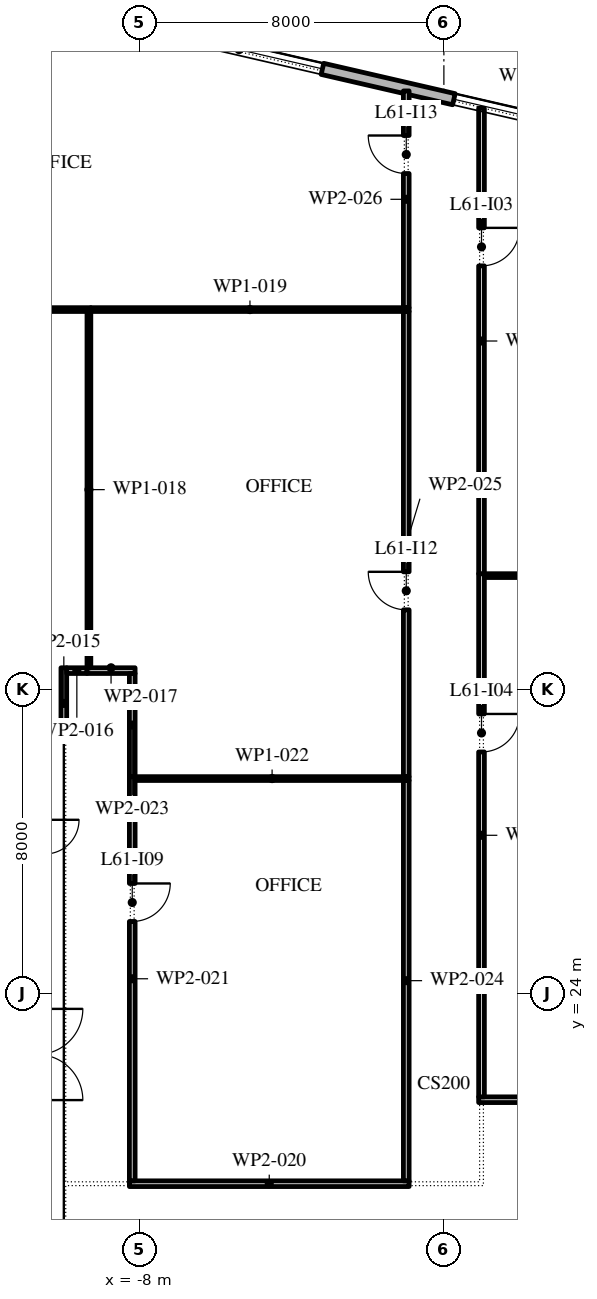
"""IFC4 building model, lengths in metres.
Left out: names, types, materials, properties, quantities, classifications, styles, units other than length and angle.
Written with IfcOpenShell. Run it as: python <this file> out.ifc"""

import sys

from ifc_helpers import new_model, si_unit, direction, frame, frame_2d, origin, place, context, subcontext, project, spatial, rectangle, extrude, element, fill, save


model = new_model("IFC4")
c1 = context("Model", 3, precision=1e-05, world=origin(), true_north=direction((0.0, 1.0)))
c2 = subcontext(c1, "Body", "Model", "MODEL_VIEW")
j1 = project(units=[si_unit("LENGTHUNIT", "METRE"), si_unit("PLANEANGLEUNIT", "RADIAN")], contexts=[c1])
p1 = place(None, origin())
s1 = spatial("IfcSite", under=j1, at=p1, CompositionType="ELEMENT")
p2 = place(p1, origin())
s2 = spatial("IfcBuilding", under=s1, at=p2, CompositionType="ELEMENT")
p3 = place(p2, frame((0.0, 0.0, 280.8)))
s3 = spatial("IfcBuildingStorey", under=s2, at=p3, CompositionType="ELEMENT", Elevation=280.8)
p4 = place(p3, frame((29.616, 40.758, 0.0), z_axis=(0.0, 0.0, 1.0), x_axis=(-0.974370532314, 0.224949029246, 0.0)))
e1 = element("IfcWall", 1, at=p4, inside=s3, PredefinedType="STANDARD", context=c2, shape_type="SweptSolid", body=[
    extrude(rectangle(XDim=48.0, YDim=0.3, at=frame_2d((24.0, 0.0))), origin(), (0.0, 0.0, 1.0), 4.0),
])
p5 = place(p4, frame((1.625, 0.0, 0.45)))
e2 = element("IfcOpeningElement", 2, at=p5, cuts=e1, PredefinedType="OPENING", context=c2, shape_type="SweptSolid", body=[
    extrude(rectangle(XDim=4.5, YDim=2.575, at=frame_2d((2.25, 1.288))), frame((0.0, 0.16, 0.0), z_axis=(0.0, -1.0, 0.0), x_axis=(1.0, 0.0, 0.0)), (0.0, 0.0, 1.0), 0.32),
])
p6 = place(p4, frame((10.575, 0.0, 0.0)))
e3 = element("IfcOpeningElement", 3, at=p6, cuts=e1, PredefinedType="OPENING", context=c2, shape_type="SweptSolid", body=[
    extrude(rectangle(XDim=2.4, YDim=3.5, at=frame_2d((1.2, 1.75))), frame((0.0, 0.16, 0.0), z_axis=(0.0, -1.0, 0.0), x_axis=(1.0, 0.0, 0.0)), (0.0, 0.0, 1.0), 0.32),
])
p7 = place(p4, frame((17.575, 0.0, 0.45)))
e4 = element("IfcOpeningElement", 4, at=p7, cuts=e1, PredefinedType="OPENING", context=c2, shape_type="SweptSolid", body=[
    extrude(rectangle(XDim=4.5, YDim=2.45, at=frame_2d((2.25, 1.225))), frame((0.0, 0.16, 0.0), z_axis=(0.0, -1.0, 0.0), x_axis=(1.0, 0.0, 0.0)), (0.0, 0.0, 1.0), 0.32),
])
p8 = place(p4, frame((25.625, 0.0, 0.45)))
e5 = element("IfcOpeningElement", 5, at=p8, cuts=e1, PredefinedType="OPENING", context=c2, shape_type="SweptSolid", body=[
    extrude(rectangle(XDim=4.5, YDim=2.45, at=frame_2d((2.25, 1.225))), frame((0.0, 0.16, 0.0), z_axis=(0.0, -1.0, 0.0), x_axis=(1.0, 0.0, 0.0)), (0.0, 0.0, 1.0), 0.32),
])
p9 = place(p4, frame((33.675, 0.0, 0.45)))
e6 = element("IfcOpeningElement", 6, at=p9, cuts=e1, PredefinedType="OPENING", context=c2, shape_type="SweptSolid", body=[
    extrude(rectangle(XDim=4.5, YDim=2.45, at=frame_2d((2.25, 1.225))), frame((0.0, 0.16, 0.0), z_axis=(0.0, -1.0, 0.0), x_axis=(1.0, 0.0, 0.0)), (0.0, 0.0, 1.0), 0.32),
])
p10 = place(p4, frame((42.775, 0.0, 0.0)))
e7 = element("IfcOpeningElement", 7, at=p10, cuts=e1, PredefinedType="OPENING", context=c2, shape_type="SweptSolid", body=[
    extrude(rectangle(XDim=2.4, YDim=3.5, at=frame_2d((1.2, 1.75))), frame((0.0, 0.16, 0.0), z_axis=(0.0, -1.0, 0.0), x_axis=(1.0, 0.0, 0.0)), (0.0, 0.0, 1.0), 0.32),
])
p11 = place(p3, frame((-19.5, 42.0, 0.0), z_axis=(0.0, 0.0, 1.0), x_axis=(1.0, 0.0, 0.0)))
e8 = element("IfcWall", 8, at=p11, inside=s3, PredefinedType="PARTITIONING", context=c2, shape_type="SweptSolid", body=[
    extrude(rectangle(XDim=10.21, YDim=0.1, at=frame_2d((5.105, 0.0))), origin(), (0.0, 0.0, 1.0), 4.0),
])
p12 = place(p11, frame((2.7, 0.0, 0.0)))
e9 = element("IfcOpeningElement", 9, at=p12, cuts=e8, PredefinedType="OPENING", context=c2, shape_type="SweptSolid", body=[
    extrude(rectangle(XDim=0.9, YDim=2.1, at=frame_2d((0.45, 1.05))), frame((0.0, 0.06, 0.0), z_axis=(0.0, -1.0, 0.0), x_axis=(1.0, 0.0, 0.0)), (0.0, 0.0, 1.0), 0.12),
])
p13 = place(p3, frame((-10.0, 30.7, 0.0), z_axis=(0.0, 0.0, 1.0), x_axis=(0.0, 1.0, 0.0)))
e10 = element("IfcWall", 10, at=p13, inside=s3, PredefinedType="PARTITIONING", context=c2, shape_type="SweptSolid", body=[
    extrude(rectangle(XDim=1.875, YDim=0.15, at=frame_2d((0.938, 0.0))), origin(), (0.0, 0.0, 1.0), 4.0),
])
p14 = place(p3, frame((-9.925, 32.5, 0.0), z_axis=(0.0, 0.0, 1.0), x_axis=(1.0, 0.0, 0.0)))
e11 = element("IfcWall", 11, at=p14, inside=s3, PredefinedType="PARTITIONING", context=c2, shape_type="SweptSolid", body=[
    extrude(rectangle(XDim=0.535, YDim=0.15, at=frame_2d((0.268, 0.0))), origin(), (0.0, 0.0, 1.0), 4.0),
])
p15 = place(p3, frame((-9.39, 32.5, 0.0), z_axis=(0.0, 0.0, 1.0), x_axis=(1.0, 0.0, 0.0)))
e12 = element("IfcWall", 12, at=p15, inside=s3, PredefinedType="PARTITIONING", context=c2, shape_type="SweptSolid", body=[
    extrude(rectangle(XDim=1.265, YDim=0.15, at=frame_2d((0.632, 0.0))), origin(), (0.0, 0.0, 1.0), 4.0),
])
p16 = place(p3, frame((-9.34, 41.95, 0.0), z_axis=(0.0, 0.0, 1.0), x_axis=(0.0, -1.0, 0.0)))
e13 = element("IfcWall", 13, at=p16, inside=s3, PredefinedType="PARTITIONING", context=c2, shape_type="SweptSolid", body=[
    extrude(rectangle(XDim=9.375, YDim=0.1, at=frame_2d((4.688, 0.0))), origin(), (0.0, 0.0, 1.0), 4.0),
])
p17 = place(p3, frame((-9.29, 42.0, 0.0), z_axis=(0.0, 0.0, 1.0), x_axis=(1.0, 0.0, 0.0)))
e14 = element("IfcWall", 14, at=p17, inside=s3, PredefinedType="PARTITIONING", context=c2, shape_type="SweptSolid", body=[
    extrude(rectangle(XDim=8.375, YDim=0.1, at=frame_2d((4.188, 0.0))), origin(), (0.0, 0.0, 1.0), 4.0),
])
p18 = place(p3, frame((-8.275, 19.0, 0.0), z_axis=(0.0, 0.0, 1.0), x_axis=(1.0, 0.0, 0.0)))
e15 = element("IfcWall", 15, at=p18, inside=s3, PredefinedType="PARTITIONING", context=c2, shape_type="SweptSolid", body=[
    extrude(rectangle(XDim=7.36, YDim=0.15, at=frame_2d((3.68, 0.0))), origin(), (0.0, 0.0, 1.0), 4.0),
])
p19 = place(p3, frame((-8.2, 29.71, 0.0), z_axis=(0.0, 0.0, 1.0), x_axis=(0.0, -1.0, 0.0)))
e16 = element("IfcWall", 16, at=p19, inside=s3, PredefinedType="PARTITIONING", context=c2, shape_type="SweptSolid", body=[
    extrude(rectangle(XDim=10.635, YDim=0.15, at=frame_2d((5.317, 0.0))), origin(), (0.0, 0.0, 1.0), 4.0),
])
p20 = place(p19, frame((2.81, 0.0, 0.0)))
e17 = element("IfcOpeningElement", 17, at=p20, cuts=e16, PredefinedType="OPENING", context=c2, shape_type="SweptSolid", body=[
    extrude(rectangle(XDim=1.0, YDim=2.1, at=frame_2d((0.5, 1.05))), frame((0.0, 0.085, 0.0), z_axis=(0.0, -1.0, 0.0), x_axis=(1.0, 0.0, 0.0)), (0.0, 0.0, 1.0), 0.17),
])
p21 = place(p3, frame((-8.125, 29.66, 0.0), z_axis=(0.0, 0.0, 1.0), x_axis=(1.0, 0.0, 0.0)))
e18 = element("IfcWall", 18, at=p21, inside=s3, PredefinedType="PARTITIONING", context=c2, shape_type="SweptSolid", body=[
    extrude(rectangle(XDim=7.21, YDim=0.1, at=frame_2d((3.605, 0.0))), origin(), (0.0, 0.0, 1.0), 4.0),
])
p22 = place(p3, frame((-8.2, 32.425, 0.0), z_axis=(0.0, 0.0, 1.0), x_axis=(0.0, -1.0, 0.0)))
e19 = element("IfcWall", 19, at=p22, inside=s3, PredefinedType="PARTITIONING", context=c2, shape_type="SweptSolid", body=[
    extrude(rectangle(XDim=2.715, YDim=0.15, at=frame_2d((1.357, 0.0))), origin(), (0.0, 0.0, 1.0), 4.0),
])
p23 = place(p3, frame((-0.99, 19.075, 0.0), z_axis=(0.0, 0.0, 1.0), x_axis=(0.0, 1.0, 0.0)))
e20 = element("IfcWall", 20, at=p23, inside=s3, PredefinedType="PARTITIONING", context=c2, shape_type="SweptSolid", body=[
    extrude(rectangle(XDim=10.535, YDim=0.15, at=frame_2d((5.268, 0.0))), origin(), (0.0, 0.0, 1.0), 4.0),
])
p24 = place(p3, frame((-0.99, 29.71, 0.0), z_axis=(0.0, 0.0, 1.0), x_axis=(0.0, 1.0, 0.0)))
e21 = element("IfcWall", 21, at=p24, inside=s3, PredefinedType="PARTITIONING", context=c2, shape_type="SweptSolid", body=[
    extrude(rectangle(XDim=12.24, YDim=0.15, at=frame_2d((6.12, 0.0))), origin(), (0.0, 0.0, 1.0), 4.0),
])
p25 = place(p24, frame((4.39, 0.0, 0.0)))
e22 = element("IfcOpeningElement", 22, at=p25, cuts=e21, PredefinedType="OPENING", context=c2, shape_type="SweptSolid", body=[
    extrude(rectangle(XDim=1.0, YDim=2.1, at=frame_2d((0.5, 1.05))), frame((0.0, 0.085, 0.0), z_axis=(0.0, -1.0, 0.0), x_axis=(1.0, 0.0, 0.0)), (0.0, 0.0, 1.0), 0.17),
])
p26 = place(p3, frame((-0.99, 42.05, 0.0), z_axis=(0.0, 0.0, 1.0), x_axis=(0.0, 1.0, 0.0)))
e23 = element("IfcWall", 23, at=p26, inside=s3, PredefinedType="PARTITIONING", context=c2, shape_type="SweptSolid", body=[
    extrude(rectangle(XDim=5.703, YDim=0.15, at=frame_2d((2.852, 0.0))), origin(), (0.0, 0.0, 1.0), 4.0),
])
p27 = place(p26, frame((3.53, 0.0, 0.0)))
e24 = element("IfcOpeningElement", 24, at=p27, cuts=e23, PredefinedType="OPENING", context=c2, shape_type="SweptSolid", body=[
    extrude(rectangle(XDim=1.0, YDim=2.1, at=frame_2d((0.5, 1.05))), frame((0.0, 0.085, 0.0), z_axis=(0.0, -1.0, 0.0), x_axis=(1.0, 0.0, 0.0)), (0.0, 0.0, 1.0), 0.17),
])
p28 = place(p3, frame((0.915, 21.21, 0.0), z_axis=(0.0, 0.0, 1.0), x_axis=(1.0, 0.0, 0.0)))
e25 = element("IfcWall", 25, at=p28, inside=s3, PredefinedType="PARTITIONING", context=c2, shape_type="SweptSolid", body=[
    extrude(rectangle(XDim=7.36, YDim=0.15, at=frame_2d((3.68, 0.0))), origin(), (0.0, 0.0, 1.0), 4.0),
])
p29 = place(p3, frame((0.99, 35.05, 0.0), z_axis=(0.0, 0.0, 1.0), x_axis=(0.0, -1.0, 0.0)))
e26 = element("IfcWall", 26, at=p29, inside=s3, PredefinedType="PARTITIONING", context=c2, shape_type="SweptSolid", body=[
    extrude(rectangle(XDim=13.765, YDim=0.15, at=frame_2d((6.883, 0.0))), origin(), (0.0, 0.0, 1.0), 4.0),
])
p30 = place(p29, frame((3.69, 0.0, 0.0)))
e27 = element("IfcOpeningElement", 27, at=p30, cuts=e26, PredefinedType="OPENING", context=c2, shape_type="SweptSolid", body=[
    extrude(rectangle(XDim=1.0, YDim=2.1, at=frame_2d((0.5, 1.05))), frame((0.0, 0.085, 0.0), z_axis=(0.0, -1.0, 0.0), x_axis=(1.0, 0.0, 0.0)), (0.0, 0.0, 1.0), 0.17),
])
p31 = place(p3, frame((0.99, 47.296, 0.0), z_axis=(0.0, 0.0, 1.0), x_axis=(0.0, -1.0, 0.0)))
e28 = element("IfcWall", 28, at=p31, inside=s3, PredefinedType="PARTITIONING", context=c2, shape_type="SweptSolid", body=[
    extrude(rectangle(XDim=12.246, YDim=0.15, at=frame_2d((6.123, 0.0))), origin(), (0.0, 0.0, 1.0), 4.0),
])
p32 = place(p31, frame((3.146, 0.0, 0.0)))
e29 = element("IfcOpeningElement", 29, at=p32, cuts=e28, PredefinedType="OPENING", context=c2, shape_type="SweptSolid", body=[
    extrude(rectangle(XDim=1.0, YDim=2.1, at=frame_2d((0.5, 1.05))), frame((0.0, 0.085, 0.0), z_axis=(0.0, -1.0, 0.0), x_axis=(1.0, 0.0, 0.0)), (0.0, 0.0, 1.0), 0.17),
])
p33 = place(p3, frame((14.24, 35.0, 0.0), z_axis=(0.0, 0.0, 1.0), x_axis=(-1.0, 0.0, 0.0)))
e30 = element("IfcWall", 30, at=p33, inside=s3, PredefinedType="PARTITIONING", context=c2, shape_type="SweptSolid", body=[
    extrude(rectangle(XDim=13.175, YDim=0.1, at=frame_2d((6.587, 0.0))), origin(), (0.0, 0.0, 1.0), 4.0),
])
p34 = place(p8, origin())
e31 = element("IfcWindow", 31, at=p34, inside=s3, PartitioningType="DOUBLE_PANEL_VERTICAL", PredefinedType="WINDOW", context=c2, shape_type="SweptSolid", body=[
    extrude(rectangle(XDim=4.5, YDim=2.45, at=frame_2d((2.25, 1.225))), frame((0.0, 0.03, 0.0), z_axis=(0.0, -1.0, 0.0), x_axis=(1.0, 0.0, 0.0)), (0.0, 0.0, 1.0), 0.06),
])
fill(e5, e31)
p35 = place(p9, origin())
e32 = element("IfcWindow", 32, at=p35, inside=s3, PartitioningType="DOUBLE_PANEL_VERTICAL", PredefinedType="WINDOW", context=c2, shape_type="SweptSolid", body=[
    extrude(rectangle(XDim=4.5, YDim=2.45, at=frame_2d((2.25, 1.225))), frame((0.0, 0.03, 0.0), z_axis=(0.0, -1.0, 0.0), x_axis=(1.0, 0.0, 0.0)), (0.0, 0.0, 1.0), 0.06),
])
fill(e6, e32)
p36 = place(p32, origin())
e33 = element("IfcDoor", 33, at=p36, inside=s3, OperationType="SINGLE_SWING_RIGHT", PredefinedType="DOOR", context=c2, shape_type="SweptSolid", body=[
    extrude(rectangle(XDim=1.0, YDim=2.1, at=frame_2d((0.5, 1.05))), frame((0.0, 0.025, 0.0), z_axis=(0.0, -1.0, 0.0), x_axis=(1.0, 0.0, 0.0)), (0.0, 0.0, 1.0), 0.05),
])
fill(e29, e33)
p37 = place(p30, origin())
e34 = element("IfcDoor", 34, at=p37, inside=s3, OperationType="SINGLE_SWING_RIGHT", PredefinedType="DOOR", context=c2, shape_type="SweptSolid", body=[
    extrude(rectangle(XDim=1.0, YDim=2.1, at=frame_2d((0.5, 1.05))), frame((0.0, 0.025, 0.0), z_axis=(0.0, -1.0, 0.0), x_axis=(1.0, 0.0, 0.0)), (0.0, 0.0, 1.0), 0.05),
])
fill(e27, e34)
p38 = place(p20, origin())
e35 = element("IfcDoor", 35, at=p38, inside=s3, OperationType="SINGLE_SWING_RIGHT", PredefinedType="DOOR", context=c2, shape_type="SweptSolid", body=[
    extrude(rectangle(XDim=1.0, YDim=2.1, at=frame_2d((0.5, 1.05))), frame((0.0, 0.025, 0.0), z_axis=(0.0, -1.0, 0.0), x_axis=(1.0, 0.0, 0.0)), (0.0, 0.0, 1.0), 0.05),
])
fill(e17, e35)
p39 = place(p25, origin())
e36 = element("IfcDoor", 36, at=p39, inside=s3, OperationType="SINGLE_SWING_LEFT", PredefinedType="DOOR", context=c2, shape_type="SweptSolid", body=[
    extrude(rectangle(XDim=1.0, YDim=2.1, at=frame_2d((0.5, 1.05))), frame((0.0, 0.025, 0.0), z_axis=(0.0, -1.0, 0.0), x_axis=(1.0, 0.0, 0.0)), (0.0, 0.0, 1.0), 0.05),
])
fill(e22, e36)
p40 = place(p27, origin())
e37 = element("IfcDoor", 37, at=p40, inside=s3, OperationType="SINGLE_SWING_LEFT", PredefinedType="DOOR", context=c2, shape_type="SweptSolid", body=[
    extrude(rectangle(XDim=1.0, YDim=2.1, at=frame_2d((0.5, 1.05))), frame((0.0, 0.025, 0.0), z_axis=(0.0, -1.0, 0.0), x_axis=(1.0, 0.0, 0.0)), (0.0, 0.0, 1.0), 0.05),
])
fill(e24, e37)
save(model, sys.argv[1])
